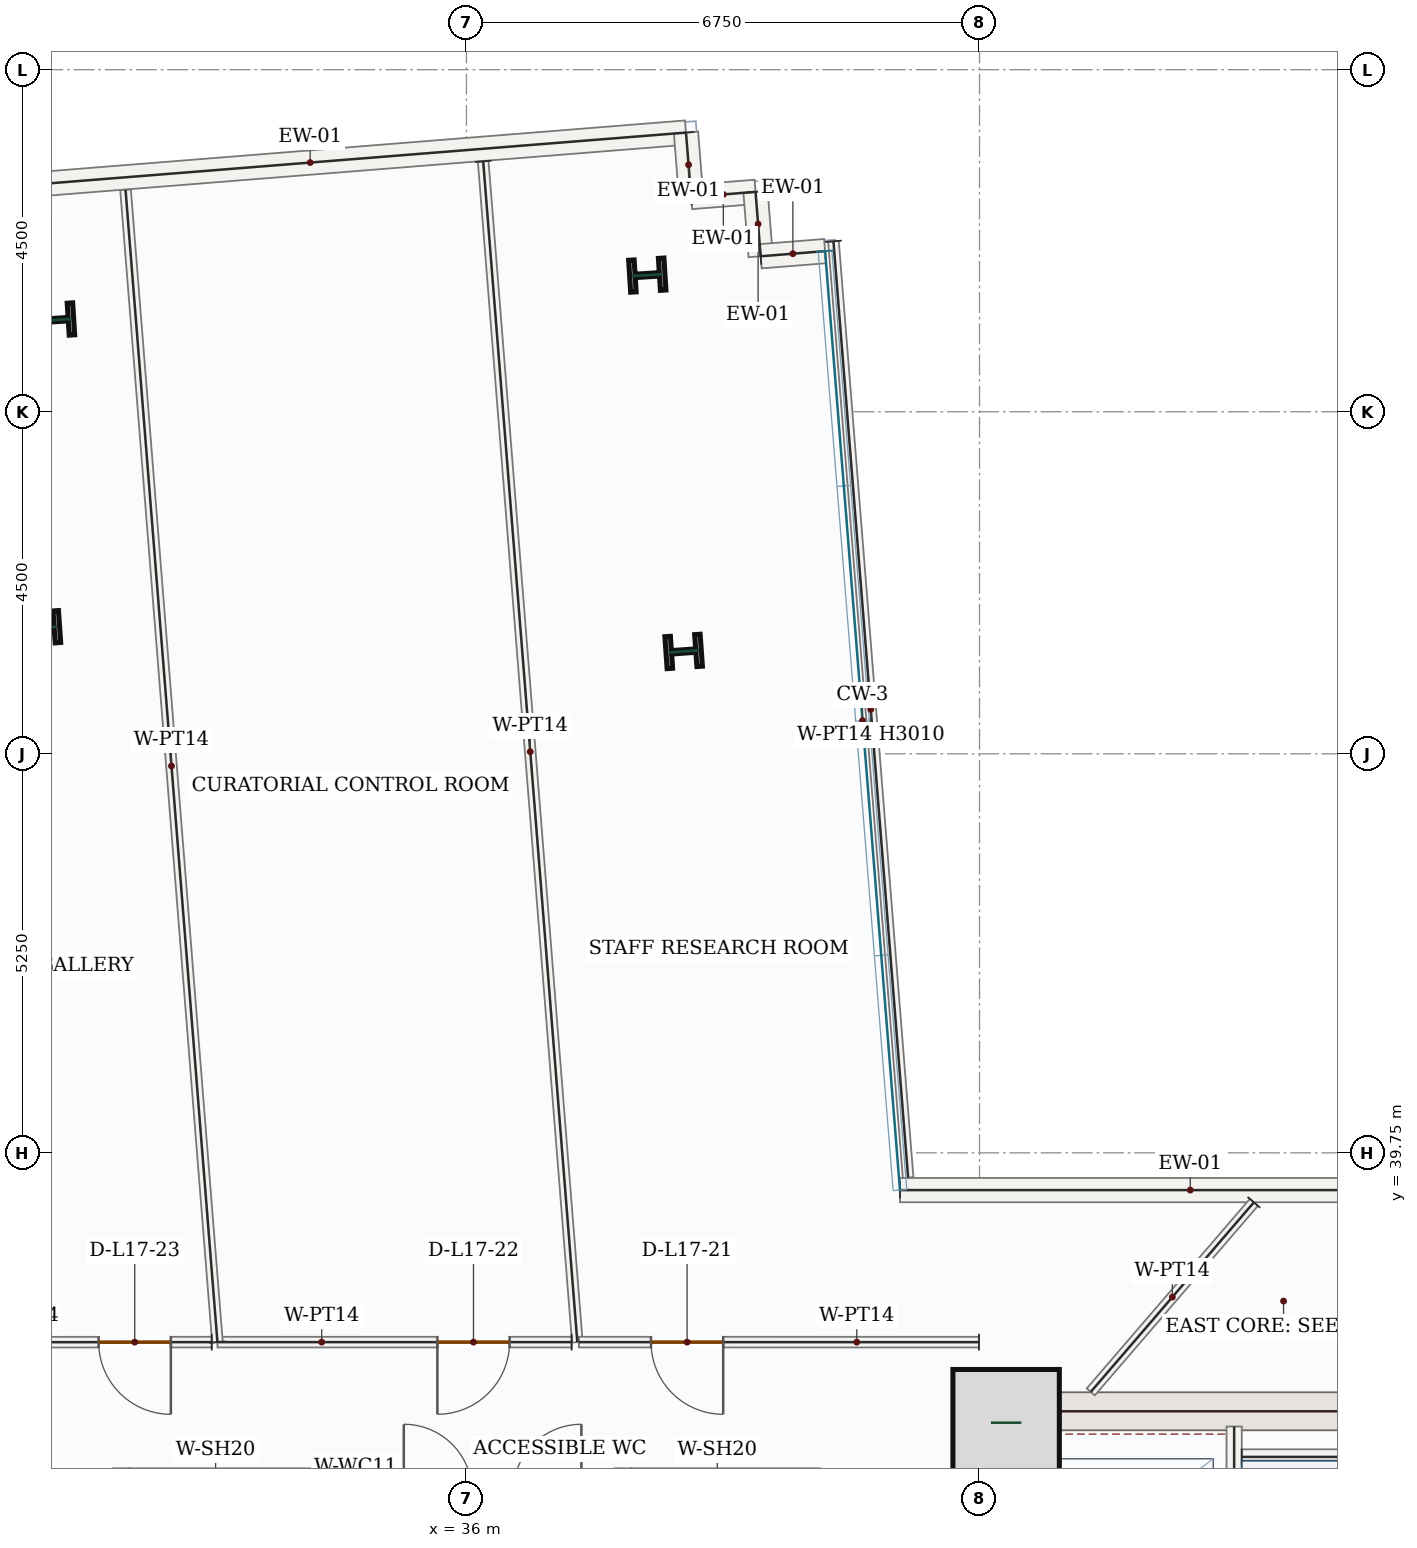
"""IFC4 building model, lengths in metres.
Left out: names, types, materials, properties, quantities, classifications, styles, units other than length and angle.
Written with IfcOpenShell. Run it as: python <this file> out.ifc"""

import sys

from ifc_helpers import new_model, si_unit, direction, frame, frame_2d, origin, origin_2d, place, context, subcontext, project, spatial, rectangle, i_section, extrude, source, transform, mapped, element, fill, save


model = new_model("IFC4")
c1 = context("Model", 3, precision=1e-05, world=origin(), true_north=direction((0.0, 1.0)))
c2 = subcontext(c1, "Body", "Model", "MODEL_VIEW")
j1 = project(units=[si_unit("LENGTHUNIT", "METRE"), si_unit("PLANEANGLEUNIT", "RADIAN")], contexts=[c1])
p1 = place(None, origin())
s1 = spatial("IfcSite", under=j1, at=p1, CompositionType="ELEMENT")
p2 = place(p1, origin())
s2 = spatial("IfcBuilding", under=s1, at=p2, CompositionType="ELEMENT")
p3 = place(p2, frame((0.0, 0.0, 79.5)))
s3 = spatial("IfcBuildingStorey", under=s2, at=p3, CompositionType="ELEMENT", Elevation=79.5)
p4 = place(p3, frame((43.0, 28.05, 0.0), z_axis=(0.0, 0.0, 1.0), x_axis=(0.0, 1.0, 0.0)))
e1 = element("IfcWall", 1, at=p4, inside=s3, PredefinedType="SHEAR", context=c2, shape_type="SweptSolid", body=[
    extrude(rectangle(XDim=8.55, YDim=0.5, at=frame_2d((4.275, 0.0))), origin(), (0.0, 0.0, 1.0), 3.95),
])
p5 = place(p4, frame((1.5, 0.0, 0.0)))
e2 = element("IfcOpeningElement", 2, at=p5, cuts=e1, PredefinedType="OPENING", context=c2, shape_type="SweptSolid", body=[
    extrude(rectangle(XDim=1.1, YDim=2.2, at=frame_2d((0.55, 1.1))), frame((0.0, 0.26, 0.0), z_axis=(0.0, -1.0, 0.0), x_axis=(1.0, 0.0, 0.0)), (0.0, 0.0, 1.0), 0.52),
])
m1 = source(origin(), c2, "Body", "SweptSolid", [
    extrude(rectangle(XDim=7.0, YDim=0.5, at=frame_2d((3.5, 0.0))), origin(), (0.0, 0.0, 1.0), 3.95),
])
p6 = place(p3, frame((43.25, 36.35, 0.0), z_axis=(0.0, 0.0, 1.0), x_axis=(1.0, 0.0, 0.0)))
e3 = element("IfcWall", 3, at=p6, inside=s3, PredefinedType="SHEAR", context=c2, shape_type="MappedRepresentation", body=[
    mapped(m1, transform((0.0, 0.0, 0.0), x_axis=(1.0, 0.0, 0.0), y_axis=(0.0, 1.0, 0.0), z_axis=(0.0, 0.0, 1.0), scale=1.0)),
])
m2 = source(origin(), c2, "Body", "SweptSolid", [
    extrude(rectangle(XDim=1.4, YDim=1.4, at=origin_2d()), origin(), (0.0, 0.0, 1.0), 4.2),
])
p7 = place(p3, frame((43.1, 36.2, 0.0), z_axis=(0.0, 0.0, 1.0), x_axis=(1.0, 0.0, 0.0)))
e4 = element("IfcColumn", 4, at=p7, inside=s3, PredefinedType="COLUMN", context=c2, shape_type="MappedRepresentation", body=[
    mapped(m2, transform((0.0, 0.0, 0.0), x_axis=(1.0, 0.0, 0.0), y_axis=(0.0, 1.0, 0.0), z_axis=(0.0, 0.0, 1.0), scale=1.0)),
])
m3 = source(origin(), c2, "Body", "SweptSolid", [
    extrude(i_section(OverallWidth=0.421, OverallDepth=0.465, WebThickness=0.045, FlangeThickness=0.073, FilletRadius=0.018, at=origin_2d()), origin(), (0.0, 0.0, 1.0), 4.2),
])
for number, where, z_axis, x_axis in (
    (5, (38.857, 46.346, 0.0), (0.0, 0.0, 1.0), (-0.07, 0.998, 0.0)),
    (6, (30.415, 46.658, 0.0), (0.0, 0.0, 1.0), (-0.07, 0.998, 0.0)),
    (7, (38.379, 51.297, 0.0), (0.0, 0.0, 1.0), (-0.063, 0.998, 0.0)),
    (8, (30.601, 50.708, 0.0), (0.0, 0.0, 1.0), (-0.063, 0.998, 0.0)),
):
    element("IfcColumn", number, at=place(p3, frame(where, z_axis=z_axis, x_axis=x_axis)), inside=s3, PredefinedType="COLUMN", context=c2, shape_type="MappedRepresentation", body=[
        mapped(m3, transform((0.0, 0.0, 0.0), x_axis=(1.0, 0.0, 0.0), y_axis=(0.0, 1.0, 0.0), z_axis=(0.0, 0.0, 1.0), scale=1.0)),
    ])
m4 = source(origin(), c2, "Body", "SweptSolid", [
    extrude(rectangle(XDim=9.92, YDim=0.32, at=frame_2d((4.96, 0.0))), origin(), (0.0, 0.0, 1.0), 3.95),
])
p8 = place(p3, frame((29.0, 52.384, 0.0), z_axis=(0.0, 0.0, 1.0), x_axis=(0.996833485558, 0.079517306731, 0.0)))
e9 = element("IfcWall", 9, at=p8, inside=s3, PredefinedType="SOLIDWALL", context=c2, shape_type="MappedRepresentation", body=[
    mapped(m4, transform((0.0, 0.0, 0.0), x_axis=(1.0, 0.0, 0.0), y_axis=(0.0, 1.0, 0.0), z_axis=(0.0, 0.0, 1.0), scale=1.0)),
])
m5 = source(origin(), c2, "Body", "SweptSolid", [
    extrude(rectangle(XDim=0.85, YDim=0.32, at=frame_2d((0.425, 0.0))), origin(), (0.0, 0.0, 1.0), 3.95),
])
p9 = place(p3, frame((38.888, 53.173, 0.0), z_axis=(0.0, 0.0, 1.0), x_axis=(0.079551174585, -0.996830783344, 0.0)))
e10 = element("IfcWall", 10, at=p9, inside=s3, PredefinedType="SOLIDWALL", context=c2, shape_type="MappedRepresentation", body=[
    mapped(m5, transform((0.0, 0.0, 0.0), x_axis=(1.0, 0.0, 0.0), y_axis=(0.0, 1.0, 0.0), z_axis=(0.0, 0.0, 1.0), scale=1.0)),
])
m6 = source(origin(), c2, "Body", "SweptSolid", [
    extrude(rectangle(XDim=0.85, YDim=0.32, at=frame_2d((0.425, 0.0))), origin(), (0.0, 0.0, 1.0), 3.95),
])
for number, where, z_axis, x_axis in (
    (11, (38.956, 52.325, 0.0), (0.0, 0.0, 1.0), (0.997, 0.079, 0.0)),
    (12, (39.803, 52.393, 0.0), (0.0, 0.0, 1.0), (0.08, -0.997, 0.0)),
):
    element("IfcWall", number, at=place(p3, frame(where, z_axis=z_axis, x_axis=x_axis)), inside=s3, PredefinedType="SOLIDWALL", context=c2, shape_type="MappedRepresentation", body=[
        mapped(m6, transform((0.0, 0.0, 0.0), x_axis=(1.0, 0.0, 0.0), y_axis=(0.0, 1.0, 0.0), z_axis=(0.0, 0.0, 1.0), scale=1.0)),
    ])
p10 = place(p3, frame((39.871, 51.545, 0.0), z_axis=(0.0, 0.0, 1.0), x_axis=(0.996830783344, 0.079551174585, 0.0)))
e13 = element("IfcWall", 13, at=p10, inside=s3, PredefinedType="SOLIDWALL", context=c2, shape_type="MappedRepresentation", body=[
    mapped(m5, transform((0.0, 0.0, 0.0), x_axis=(1.0, 0.0, 0.0), y_axis=(0.0, 1.0, 0.0), z_axis=(0.0, 0.0, 1.0), scale=1.0)),
])
m7 = source(origin(), c2, "Body", "SweptSolid", [
    extrude(rectangle(XDim=7.639, YDim=0.32, at=frame_2d((3.819, 0.0))), origin(), (0.0, 0.0, 1.0), 3.95),
])
p11 = place(p3, frame((41.703, 39.26, 0.0), z_axis=(0.0, 0.0, 1.0), x_axis=(1.0, 0.0, 0.0)))
e14 = element("IfcWall", 14, at=p11, inside=s3, PredefinedType="SOLIDWALL", context=c2, shape_type="MappedRepresentation", body=[
    mapped(m7, transform((0.0, 0.0, 0.0), x_axis=(1.0, 0.0, 0.0), y_axis=(0.0, 1.0, 0.0), z_axis=(0.0, 0.0, 1.0), scale=1.0)),
])
p12 = place(p3, frame((46.1, 28.15, 0.0), z_axis=(0.0, 0.0, 1.0), x_axis=(0.0, 1.0, 0.0)))
e15 = element("IfcWall", 15, at=p12, inside=s3, PredefinedType="SOLIDWALL", context=c2, shape_type="SweptSolid", body=[
    extrude(rectangle(XDim=8.0, YDim=0.2, at=frame_2d((4.0, 0.0))), origin(), (0.0, 0.0, 1.0), 3.95),
])
p13 = place(p12, frame((0.4, 0.0, 0.0)))
e16 = element("IfcOpeningElement", 16, at=p13, cuts=e15, PredefinedType="OPENING", context=c2, shape_type="SweptSolid", body=[
    extrude(rectangle(XDim=1.05, YDim=2.15, at=frame_2d((0.525, 1.075))), frame((0.0, 0.11, 0.0), z_axis=(0.0, -1.0, 0.0), x_axis=(1.0, 0.0, 0.0)), (0.0, 0.0, 1.0), 0.22),
])
m8 = source(origin(), c2, "Body", "SweptSolid", [
    extrude(rectangle(XDim=3.25, YDim=0.2, at=frame_2d((1.625, 0.0))), origin(), (0.0, 0.0, 1.0), 3.95),
])
p14 = place(p3, frame((46.2, 35.75, 0.0), z_axis=(0.0, 0.0, 1.0), x_axis=(1.0, 0.0, 0.0)))
e17 = element("IfcWall", 17, at=p14, inside=s3, PredefinedType="SOLIDWALL", context=c2, shape_type="MappedRepresentation", body=[
    mapped(m8, transform((0.0, 0.0, 0.0), x_axis=(1.0, 0.0, 0.0), y_axis=(0.0, 1.0, 0.0), z_axis=(0.0, 0.0, 1.0), scale=1.0)),
])
m9 = source(origin(), c2, "Body", "SweptSolid", [
    extrude(rectangle(XDim=2.4, YDim=0.2, at=frame_2d((1.2, 0.0))), origin(), (0.0, 0.0, 1.0), 3.95),
])
for number, where, z_axis, x_axis in (
    (18, (31.45, 33.2, 0.0), (0.0, 0.0, 1.0), (0.0, 1.0, 0.0)),
    (19, (33.95, 33.2, 0.0), (0.0, 0.0, 1.0), (0.0, 1.0, 0.0)),
    (20, (38.05, 33.2, 0.0), (0.0, 0.0, 1.0), (0.0, 1.0, 0.0)),
    (21, (40.55, 33.2, 0.0), (0.0, 0.0, 1.0), (0.0, 1.0, 0.0)),
):
    element("IfcWall", number, at=place(p3, frame(where, z_axis=z_axis, x_axis=x_axis)), inside=s3, PredefinedType="SOLIDWALL", context=c2, shape_type="MappedRepresentation", body=[
        mapped(m9, transform((0.0, 0.0, 0.0), x_axis=(1.0, 0.0, 0.0), y_axis=(0.0, 1.0, 0.0), z_axis=(0.0, 0.0, 1.0), scale=1.0)),
    ])
m10 = source(origin(), c2, "Body", "SweptSolid", [
    extrude(rectangle(XDim=15.583, YDim=0.14, at=frame_2d((7.792, 0.0))), origin(), (0.0, 0.0, 1.0), 3.95),
])
p15 = place(p3, frame((36.22, 52.794, 0.0), z_axis=(0.0, 0.0, 1.0), x_axis=(0.079507979427, -0.996834229552, 0.0)))
e22 = element("IfcWall", 22, at=p15, inside=s3, PredefinedType="PARTITIONING", context=c2, shape_type="MappedRepresentation", body=[
    mapped(m10, transform((0.0, 0.0, 0.0), x_axis=(1.0, 0.0, 0.0), y_axis=(0.0, 1.0, 0.0), z_axis=(0.0, 0.0, 1.0), scale=1.0)),
])
p16 = place(p3, frame((37.384, 37.26, 0.0), z_axis=(0.0, 0.0, 1.0), x_axis=(-1.0, 0.0, 0.0)))
e23 = element("IfcWall", 23, at=p16, inside=s3, PredefinedType="PARTITIONING", context=c2, shape_type="SweptSolid", body=[
    extrude(rectangle(XDim=4.66, YDim=0.14, at=frame_2d((2.33, 0.0))), origin(), (0.0, 0.0, 1.0), 3.95),
])
p17 = place(p16, frame((0.816, 0.0, 0.0)))
e24 = element("IfcOpeningElement", 24, at=p17, cuts=e23, PredefinedType="OPENING", context=c2, shape_type="SweptSolid", body=[
    extrude(rectangle(XDim=0.95, YDim=2.15, at=frame_2d((0.475, 1.075))), frame((0.0, 0.08, 0.0), z_axis=(0.0, -1.0, 0.0), x_axis=(1.0, 0.0, 0.0)), (0.0, 0.0, 1.0), 0.16),
])
m11 = source(origin(), c2, "Body", "SweptSolid", [
    extrude(rectangle(XDim=15.207, YDim=0.14, at=frame_2d((7.604, 0.0))), origin(), (0.0, 0.0, 1.0), 3.95),
])
p18 = place(p3, frame((32.724, 37.26, 0.0), z_axis=(0.0, 0.0, 1.0), x_axis=(-0.07950146843, 0.996834748851, 0.0)))
e25 = element("IfcWall", 25, at=p18, inside=s3, PredefinedType="PARTITIONING", context=c2, shape_type="MappedRepresentation", body=[
    mapped(m11, transform((0.0, 0.0, 0.0), x_axis=(1.0, 0.0, 0.0), y_axis=(0.0, 1.0, 0.0), z_axis=(0.0, 0.0, 1.0), scale=1.0)),
])
p19 = place(p3, frame((32.649, 37.26, 0.0), z_axis=(0.0, 0.0, 1.0), x_axis=(-0.999999935313, -0.00035968633, 0.0)))
e26 = element("IfcWall", 26, at=p19, inside=s3, PredefinedType="PARTITIONING", context=c2, shape_type="SweptSolid", body=[
    extrude(rectangle(XDim=3.394, YDim=0.14, at=frame_2d((1.697, 0.0))), origin(), (0.0, 0.0, 1.0), 3.95),
])
p20 = place(p19, frame((0.538, 0.0, 0.0)))
e27 = element("IfcOpeningElement", 27, at=p20, cuts=e26, PredefinedType="OPENING", context=c2, shape_type="SweptSolid", body=[
    extrude(rectangle(XDim=0.95, YDim=2.15, at=frame_2d((0.475, 1.075))), frame((0.0, 0.08, 0.0), z_axis=(0.0, -1.0, 0.0), x_axis=(1.0, 0.0, 0.0)), (0.0, 0.0, 1.0), 0.16),
])
p21 = place(p3, frame((42.742, 37.26, 0.0), z_axis=(0.0, 0.0, 1.0), x_axis=(-0.999999998924, 4.6384341e-05, 0.0)))
e28 = element("IfcWall", 28, at=p21, inside=s3, PredefinedType="PARTITIONING", context=c2, shape_type="SweptSolid", body=[
    extrude(rectangle(XDim=5.263, YDim=0.14, at=frame_2d((2.632, 0.0))), origin(), (0.0, 0.0, 1.0), 3.95),
])
p22 = place(p21, frame((3.365, 0.0, 0.0)))
e29 = element("IfcOpeningElement", 29, at=p22, cuts=e28, PredefinedType="OPENING", context=c2, shape_type="SweptSolid", body=[
    extrude(rectangle(XDim=0.95, YDim=2.15, at=frame_2d((0.475, 1.075))), frame((0.0, 0.08, 0.0), z_axis=(0.0, -1.0, 0.0), x_axis=(1.0, 0.0, 0.0)), (0.0, 0.0, 1.0), 0.16),
])
m12 = source(origin(), c2, "Body", "SweptSolid", [
    extrude(rectangle(XDim=12.356, YDim=0.14, at=frame_2d((6.178, 0.0))), origin(), (0.0, 0.0, 1.0), 3.01),
])
p23 = place(p3, frame((40.828, 51.742, 0.0), z_axis=(0.0, 0.0, 1.0), x_axis=(0.079527689156, -0.996832657299, 0.0)))
e30 = element("IfcWall", 30, at=p23, inside=s3, PredefinedType="PARTITIONING", context=c2, shape_type="MappedRepresentation", body=[
    mapped(m12, transform((0.0, 0.0, 0.0), x_axis=(1.0, 0.0, 0.0), y_axis=(0.0, 1.0, 0.0), z_axis=(0.0, 0.0, 1.0), scale=1.0)),
])
m13 = source(origin(), c2, "Body", "SweptSolid", [
    extrude(rectangle(XDim=3.29, YDim=0.14, at=frame_2d((1.645, 0.0))), origin(), (0.0, 0.0, 1.0), 3.95),
])
p24 = place(p3, frame((46.36, 39.099, 0.0), z_axis=(0.0, 0.0, 1.0), x_axis=(-0.652214149627, -0.758034763732, 0.0)))
e31 = element("IfcWall", 31, at=p24, inside=s3, PredefinedType="PARTITIONING", context=c2, shape_type="MappedRepresentation", body=[
    mapped(m13, transform((0.0, 0.0, 0.0), x_axis=(1.0, 0.0, 0.0), y_axis=(0.0, 1.0, 0.0), z_axis=(0.0, 0.0, 1.0), scale=1.0)),
])
m14 = source(origin(), c2, "Body", "SweptSolid", [
    extrude(rectangle(XDim=0.95, YDim=2.15, at=frame_2d((0.475, 1.075))), frame((0.0, 0.025, 0.0), z_axis=(0.0, -1.0, 0.0), x_axis=(1.0, 0.0, 0.0)), (0.0, 0.0, 1.0), 0.05),
])
p25 = place(p22, origin())
e32 = element("IfcDoor", 32, at=p25, inside=s3, OperationType="SINGLE_SWING_LEFT", PredefinedType="DOOR", context=c2, shape_type="MappedRepresentation", body=[
    mapped(m14, transform((0.0, 0.0, 0.0), x_axis=(1.0, 0.0, 0.0), y_axis=(0.0, 1.0, 0.0), z_axis=(0.0, 0.0, 1.0), scale=1.0)),
])
fill(e29, e32)
p26 = place(p17, origin())
e33 = element("IfcDoor", 33, at=p26, inside=s3, OperationType="SINGLE_SWING_RIGHT", PredefinedType="DOOR", context=c2, shape_type="MappedRepresentation", body=[
    mapped(m14, transform((0.0, 0.0, 0.0), x_axis=(1.0, 0.0, 0.0), y_axis=(0.0, 1.0, 0.0), z_axis=(0.0, 0.0, 1.0), scale=1.0)),
])
fill(e24, e33)
p27 = place(p20, origin())
e34 = element("IfcDoor", 34, at=p27, inside=s3, OperationType="SINGLE_SWING_LEFT", PredefinedType="DOOR", context=c2, shape_type="MappedRepresentation", body=[
    mapped(m14, transform((0.0, 0.0, 0.0), x_axis=(1.0, 0.0, 0.0), y_axis=(0.0, 1.0, 0.0), z_axis=(0.0, 0.0, 1.0), scale=1.0)),
])
fill(e27, e34)
save(model, sys.argv[1])
